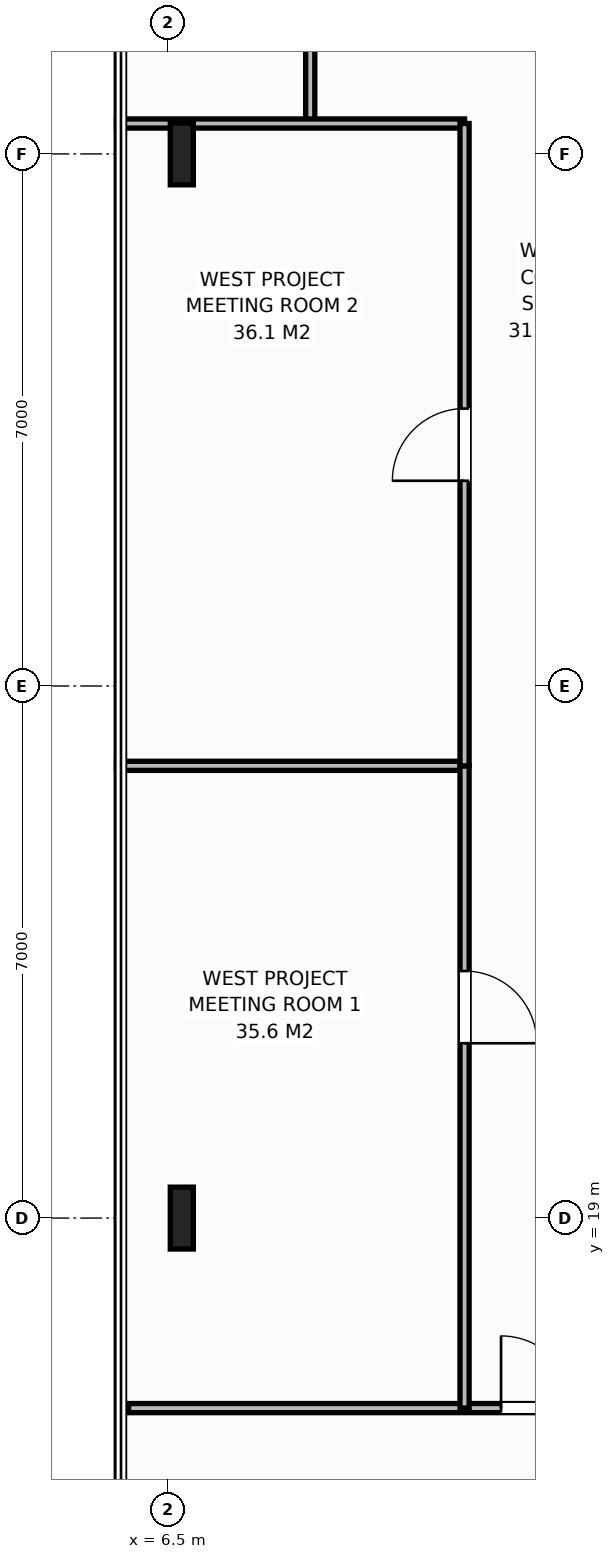
"""IFC4 building model, lengths in metres.
Left out: names, types, materials, properties, quantities, classifications, styles, units other than length and angle.
Written with IfcOpenShell. Run it as: python <this file> out.ifc"""

import sys

from ifc_helpers import new_model, si_unit, direction, frame, frame_2d, origin, origin_2d, place, context, subcontext, project, spatial, rectangle, i_section, extrude, element, fill, save


model = new_model("IFC4")
c1 = context("Model", 3, precision=1e-05, world=origin(), true_north=direction((0.0, 1.0)))
c2 = subcontext(c1, "Body", "Model", "MODEL_VIEW")
j1 = project(units=[si_unit("LENGTHUNIT", "METRE"), si_unit("PLANEANGLEUNIT", "RADIAN")], contexts=[c1])
p1 = place(None, origin())
s1 = spatial("IfcSite", under=j1, at=p1, CompositionType="ELEMENT")
p2 = place(p1, origin())
s2 = spatial("IfcBuilding", under=s1, at=p2, CompositionType="ELEMENT")
p3 = place(p2, frame((0.0, 0.0, 248.0)))
s3 = spatial("IfcBuildingStorey", under=s2, at=p3, CompositionType="ELEMENT", Elevation=248.0)
for number, where, z_axis, x_axis in (
    (1, (6.68, 19.0, 0.0), (0.0, 0.0, 1.0), (1.0, 0.0, 0.0)),
    (2, (6.68, 33.0, 0.0), (0.0, 0.0, 1.0), (1.0, 0.0, 0.0)),
):
    element("IfcColumn", number, at=place(p3, frame(where, z_axis=z_axis, x_axis=x_axis)), inside=s3, PredefinedType="COLUMN", context=c2, shape_type="SweptSolid", body=[
        extrude(i_section(OverallWidth=0.303, OverallDepth=0.814, WebThickness=0.021, FlangeThickness=0.04, at=origin_2d()), origin(), (0.0, 0.0, 1.0), 3.8),
    ])
p4 = place(p3, frame((8.37, 33.4, 0.0), z_axis=(0.0, 0.0, 1.0), x_axis=(0.0, 1.0, 0.0)))
e3 = element("IfcWall", 3, at=p4, inside=s3, PredefinedType="PARTITIONING", context=c2, shape_type="SweptSolid", body=[
    extrude(rectangle(XDim=2.1, YDim=0.12, at=frame_2d((1.05, 0.0))), origin(), (0.0, 0.0, 1.0), 3.58),
])
p5 = place(p3, frame((5.98, 16.5, 0.0), z_axis=(0.0, 0.0, 1.0), x_axis=(1.0, 0.0, 0.0)))
e4 = element("IfcWall", 4, at=p5, inside=s3, PredefinedType="PARTITIONING", context=c2, shape_type="SweptSolid", body=[
    extrude(rectangle(XDim=7.957, YDim=0.12, at=frame_2d((3.979, 0.0))), origin(), (0.0, 0.0, 1.0), 3.58),
])
p6 = place(p5, frame((4.9, 0.0, 0.0)))
e5 = element("IfcOpeningElement", 5, at=p6, cuts=e4, PredefinedType="OPENING", context=c2, shape_type="SweptSolid", body=[
    extrude(rectangle(XDim=0.95, YDim=2.15, at=frame_2d((0.475, 1.075))), frame((0.0, 0.07, 0.0), z_axis=(0.0, -1.0, 0.0), x_axis=(1.0, 0.0, 0.0)), (0.0, 0.0, 1.0), 0.14),
])
for number, where, z_axis, x_axis in (
    (6, (5.82, 33.4, 0.0), (0.0, 0.0, 1.0), (1.0, 0.0, 0.0)),
    (7, (5.82, 24.95, 0.0), (0.0, 0.0, 1.0), (1.0, 0.0, 0.0)),
):
    element("IfcWall", number, at=place(p3, frame(where, z_axis=z_axis, x_axis=x_axis)), inside=s3, PredefinedType="PARTITIONING", context=c2, shape_type="SweptSolid", body=[
        extrude(rectangle(XDim=4.58, YDim=0.12, at=frame_2d((2.29, 0.0))), origin(), (0.0, 0.0, 1.0), 3.58),
    ])
p7 = place(p3, frame((10.4, 16.5, 0.0), z_axis=(0.0, 0.0, 1.0), x_axis=(0.0, 1.0, 0.0)))
e8 = element("IfcWall", 8, at=p7, inside=s3, PredefinedType="PARTITIONING", context=c2, shape_type="SweptSolid", body=[
    extrude(rectangle(XDim=8.45, YDim=0.12, at=frame_2d((4.225, 0.0))), origin(), (0.0, 0.0, 1.0), 3.58),
])
p8 = place(p7, frame((4.8, 0.0, 0.0)))
e9 = element("IfcOpeningElement", 9, at=p8, cuts=e8, PredefinedType="OPENING", context=c2, shape_type="SweptSolid", body=[
    extrude(rectangle(XDim=0.95, YDim=2.15, at=frame_2d((0.475, 1.075))), frame((0.0, 0.07, 0.0), z_axis=(0.0, -1.0, 0.0), x_axis=(1.0, 0.0, 0.0)), (0.0, 0.0, 1.0), 0.14),
])
p9 = place(p3, frame((10.4, 24.95, 0.0), z_axis=(0.0, 0.0, 1.0), x_axis=(0.0, 1.0, 0.0)))
e10 = element("IfcWall", 10, at=p9, inside=s3, PredefinedType="PARTITIONING", context=c2, shape_type="SweptSolid", body=[
    extrude(rectangle(XDim=8.45, YDim=0.12, at=frame_2d((4.225, 0.0))), origin(), (0.0, 0.0, 1.0), 3.58),
])
p10 = place(p9, frame((3.75, 0.0, 0.0)))
e11 = element("IfcOpeningElement", 11, at=p10, cuts=e10, PredefinedType="OPENING", context=c2, shape_type="SweptSolid", body=[
    extrude(rectangle(XDim=0.95, YDim=2.15, at=frame_2d((0.475, 1.075))), frame((0.0, 0.07, 0.0), z_axis=(0.0, -1.0, 0.0), x_axis=(1.0, 0.0, 0.0)), (0.0, 0.0, 1.0), 0.14),
])
p11 = place(p6, origin())
e12 = element("IfcDoor", 12, at=p11, inside=s3, OperationType="SINGLE_SWING_LEFT", PredefinedType="DOOR", context=c2, shape_type="SweptSolid", body=[
    extrude(rectangle(XDim=0.95, YDim=2.15, at=frame_2d((0.475, 1.075))), frame((0.0, 0.025, 0.0), z_axis=(0.0, -1.0, 0.0), x_axis=(1.0, 0.0, 0.0)), (0.0, 0.0, 1.0), 0.05),
])
fill(e5, e12)
p12 = place(p8, origin())
e13 = element("IfcDoor", 13, at=p12, inside=s3, OperationType="SINGLE_SWING_RIGHT", PredefinedType="DOOR", context=c2, shape_type="SweptSolid", body=[
    extrude(rectangle(XDim=0.95, YDim=2.15, at=frame_2d((0.475, 1.075))), frame((0.0, 0.025, 0.0), z_axis=(0.0, -1.0, 0.0), x_axis=(1.0, 0.0, 0.0)), (0.0, 0.0, 1.0), 0.05),
])
fill(e9, e13)
p13 = place(p10, origin())
e14 = element("IfcDoor", 14, at=p13, inside=s3, OperationType="SINGLE_SWING_LEFT", PredefinedType="DOOR", context=c2, shape_type="SweptSolid", body=[
    extrude(rectangle(XDim=0.95, YDim=2.15, at=frame_2d((0.475, 1.075))), frame((0.0, 0.025, 0.0), z_axis=(0.0, -1.0, 0.0), x_axis=(1.0, 0.0, 0.0)), (0.0, 0.0, 1.0), 0.05),
])
fill(e11, e14)
save(model, sys.argv[1])
